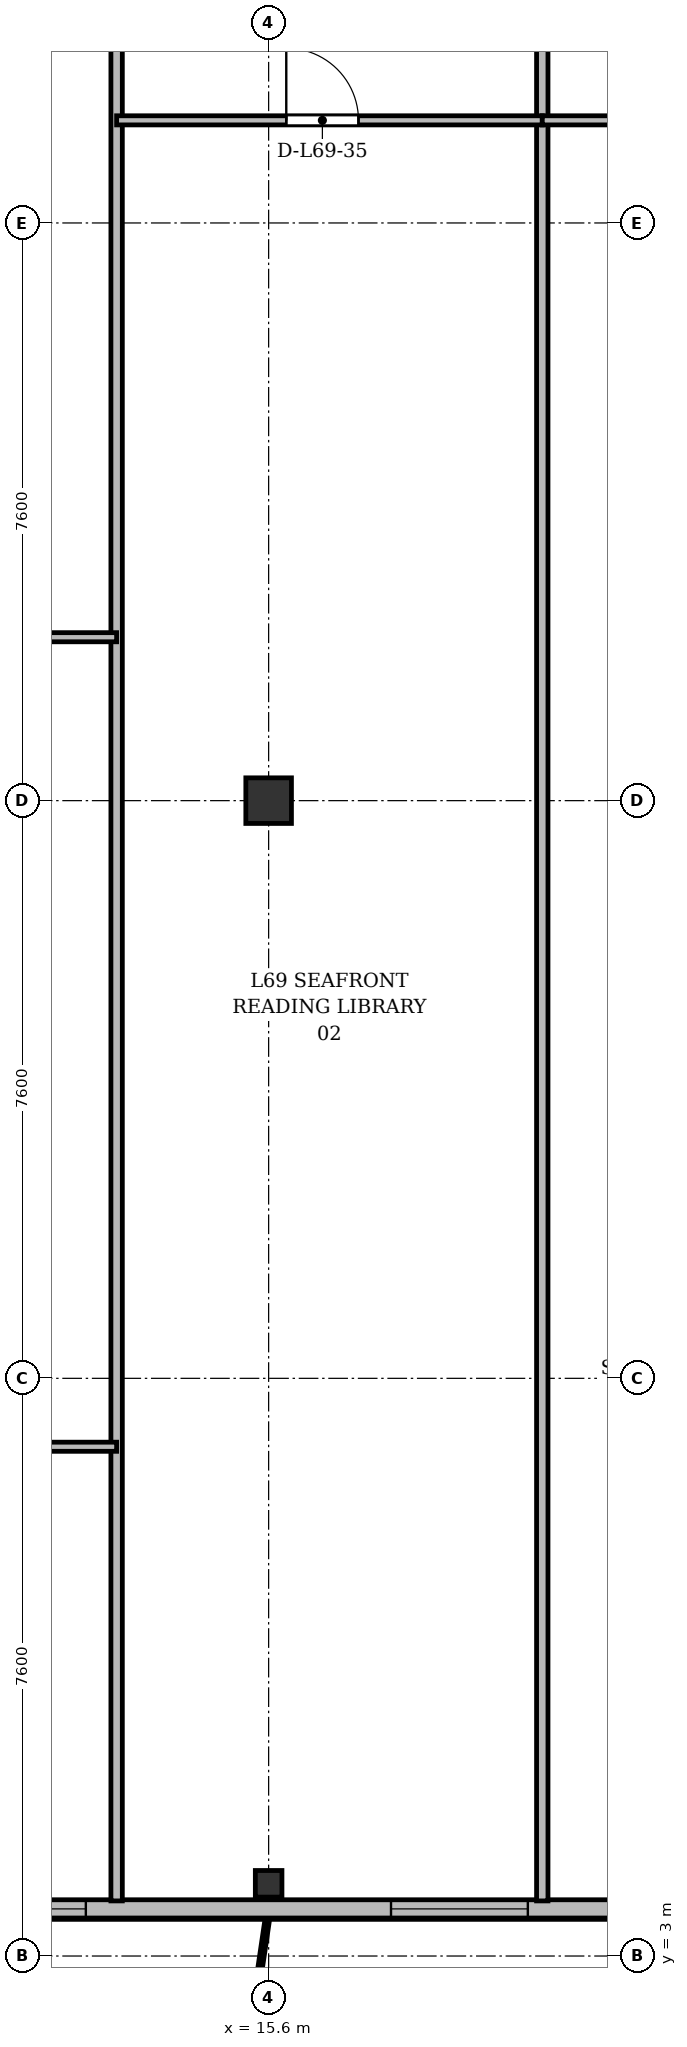
"""IFC4 building model, lengths in metres.
Left out: names, types, materials, properties, quantities, classifications, styles, units other than length and angle.
Written with IfcOpenShell. Run it as: python <this file> out.ifc"""

import sys

from ifc_helpers import new_model, si_unit, direction, frame, frame_2d, origin, origin_2d, place, context, subcontext, project, spatial, rectangle, i_section, extrude, source, transform, mapped, element, fill, save


model = new_model("IFC4")
c1 = context("Model", 3, precision=1e-05, world=origin(), true_north=direction((0.0, 1.0)))
c2 = subcontext(c1, "Body", "Model", "MODEL_VIEW")
j1 = project(units=[si_unit("LENGTHUNIT", "METRE"), si_unit("PLANEANGLEUNIT", "RADIAN")], contexts=[c1])
p1 = place(None, origin())
s1 = spatial("IfcSite", under=j1, at=p1, CompositionType="ELEMENT")
p2 = place(p1, origin())
s2 = spatial("IfcBuilding", under=s1, at=p2, CompositionType="ELEMENT")
p3 = place(p2, frame((0.0, 0.0, 266.7)))
s3 = spatial("IfcBuildingStorey", under=s2, at=p3, CompositionType="ELEMENT", Elevation=266.7)
m1 = source(origin(), c2, "Body", "SweptSolid", [
    extrude(i_section(OverallWidth=0.35, OverallDepth=0.35, WebThickness=0.018, FlangeThickness=0.028, at=origin_2d()), origin(), (0.0, 0.0, 1.0), 3.6),
])
p4 = place(p3, frame((15.6, 3.95, 0.0), z_axis=(0.0, 0.0, 1.0), x_axis=(1.0, 0.0, 0.0)))
e1 = element("IfcColumn", 1, at=p4, inside=s3, PredefinedType="COLUMN", context=c2, shape_type="MappedRepresentation", body=[
    mapped(m1, transform((0.0, 0.0, 0.0), x_axis=(1.0, 0.0, 0.0), y_axis=(0.0, 1.0, 0.0), z_axis=(0.0, 0.0, 1.0), scale=1.0)),
])
m2 = source(origin(), c2, "Body", "SweptSolid", [
    extrude(rectangle(XDim=0.6, YDim=0.6, at=origin_2d()), origin(), (0.0, 0.0, 1.0), 3.6),
])
p5 = place(p3, frame((15.6, 18.2, 0.0), z_axis=(0.0, 0.0, 1.0), x_axis=(1.0, 0.0, 0.0)))
e2 = element("IfcColumn", 2, at=p5, inside=s3, PredefinedType="COLUMN", context=c2, shape_type="MappedRepresentation", body=[
    mapped(m2, transform((0.0, 0.0, 0.0), x_axis=(1.0, 0.0, 0.0), y_axis=(0.0, 1.0, 0.0), z_axis=(0.0, 0.0, 1.0), scale=1.0)),
])
p6 = place(p3, frame((63.2, 3.62, 0.0), z_axis=(0.0, 0.0, 1.0), x_axis=(-1.0, 0.0, 0.0)))
e3 = element("IfcWall", 3, at=p6, inside=s3, PredefinedType="SOLIDWALL", context=c2, shape_type="SweptSolid", body=[
    extrude(rectangle(XDim=52.0, YDim=0.24, at=frame_2d((26.0, 0.0))), origin(), (0.0, 0.0, 1.0), 3.37),
])
p7 = place(p6, frame((0.345, 0.0, 0.9)))
e4 = element("IfcOpeningElement", 4, at=p7, cuts=e3, PredefinedType="OPENING", context=c2, shape_type="SweptSolid", body=[
    extrude(rectangle(XDim=1.2, YDim=1.65, at=frame_2d((0.6, 0.825))), frame((0.0, 0.13, 0.0), z_axis=(0.0, -1.0, 0.0), x_axis=(1.0, 0.0, 0.0)), (0.0, 0.0, 1.0), 0.26),
])
p8 = place(p6, frame((2.15, 0.0, 0.9)))
e5 = element("IfcOpeningElement", 5, at=p8, cuts=e3, PredefinedType="OPENING", context=c2, shape_type="SweptSolid", body=[
    extrude(rectangle(XDim=1.8, YDim=1.8, at=frame_2d((0.9, 0.9))), frame((0.0, 0.13, 0.0), z_axis=(0.0, -1.0, 0.0), x_axis=(1.0, 0.0, 0.0)), (0.0, 0.0, 1.0), 0.26),
])
p9 = place(p6, frame((5.42, 0.0, 0.0)))
e6 = element("IfcOpeningElement", 6, at=p9, cuts=e3, PredefinedType="OPENING", context=c2, shape_type="SweptSolid", body=[
    extrude(rectangle(XDim=1.2, YDim=2.2, at=frame_2d((0.6, 1.1))), frame((0.0, 0.13, 0.0), z_axis=(0.0, -1.0, 0.0), x_axis=(1.0, 0.0, 0.0)), (0.0, 0.0, 1.0), 0.26),
])
p10 = place(p6, frame((8.75, 0.0, 0.9)))
e7 = element("IfcOpeningElement", 7, at=p10, cuts=e3, PredefinedType="OPENING", context=c2, shape_type="SweptSolid", body=[
    extrude(rectangle(XDim=1.5, YDim=1.75, at=frame_2d((0.75, 0.875))), frame((0.0, 0.13, 0.0), z_axis=(0.0, -1.0, 0.0), x_axis=(1.0, 0.0, 0.0)), (0.0, 0.0, 1.0), 0.26),
])
p11 = place(p6, frame((14.8, 0.0, 0.9)))
e8 = element("IfcOpeningElement", 8, at=p11, cuts=e3, PredefinedType="OPENING", context=c2, shape_type="SweptSolid", body=[
    extrude(rectangle(XDim=2.0, YDim=1.95, at=frame_2d((1.0, 0.975))), frame((0.0, 0.13, 0.0), z_axis=(0.0, -1.0, 0.0), x_axis=(1.0, 0.0, 0.0)), (0.0, 0.0, 1.0), 0.26),
])
p12 = place(p6, frame((20.425, 0.0, 0.9)))
e9 = element("IfcOpeningElement", 9, at=p12, cuts=e3, PredefinedType="OPENING", context=c2, shape_type="SweptSolid", body=[
    extrude(rectangle(XDim=1.65, YDim=1.85, at=frame_2d((0.825, 0.925))), frame((0.0, 0.13, 0.0), z_axis=(0.0, -1.0, 0.0), x_axis=(1.0, 0.0, 0.0)), (0.0, 0.0, 1.0), 0.26),
])
p13 = place(p6, frame((24.05, 0.0, 0.9)))
e10 = element("IfcOpeningElement", 10, at=p13, cuts=e3, PredefinedType="OPENING", context=c2, shape_type="SweptSolid", body=[
    extrude(rectangle(XDim=1.8, YDim=1.8, at=frame_2d((0.9, 0.9))), frame((0.0, 0.13, 0.0), z_axis=(0.0, -1.0, 0.0), x_axis=(1.0, 0.0, 0.0)), (0.0, 0.0, 1.0), 0.26),
])
p14 = place(p6, frame((28.6, 0.0, 0.9)))
e11 = element("IfcOpeningElement", 11, at=p14, cuts=e3, PredefinedType="OPENING", context=c2, shape_type="SweptSolid", body=[
    extrude(rectangle(XDim=2.2, YDim=1.8, at=frame_2d((1.1, 0.9))), frame((0.0, 0.13, 0.0), z_axis=(0.0, -1.0, 0.0), x_axis=(1.0, 0.0, 0.0)), (0.0, 0.0, 1.0), 0.26),
])
p15 = place(p6, frame((34.078, 0.0, 0.0)))
e12 = element("IfcOpeningElement", 12, at=p15, cuts=e3, PredefinedType="OPENING", context=c2, shape_type="SweptSolid", body=[
    extrude(rectangle(XDim=1.2, YDim=2.2, at=frame_2d((0.6, 1.1))), frame((0.0, 0.13, 0.0), z_axis=(0.0, -1.0, 0.0), x_axis=(1.0, 0.0, 0.0)), (0.0, 0.0, 1.0), 0.26),
])
p16 = place(p6, frame((37.0, 0.0, 0.9)))
e13 = element("IfcOpeningElement", 13, at=p16, cuts=e3, PredefinedType="OPENING", context=c2, shape_type="SweptSolid", body=[
    extrude(rectangle(XDim=2.0, YDim=1.95, at=frame_2d((1.0, 0.975))), frame((0.0, 0.13, 0.0), z_axis=(0.0, -1.0, 0.0), x_axis=(1.0, 0.0, 0.0)), (0.0, 0.0, 1.0), 0.26),
])
p17 = place(p6, frame((41.075, 0.0, 0.9)))
e14 = element("IfcOpeningElement", 14, at=p17, cuts=e3, PredefinedType="OPENING", context=c2, shape_type="SweptSolid", body=[
    extrude(rectangle(XDim=1.65, YDim=1.85, at=frame_2d((0.825, 0.925))), frame((0.0, 0.13, 0.0), z_axis=(0.0, -1.0, 0.0), x_axis=(1.0, 0.0, 0.0)), (0.0, 0.0, 1.0), 0.26),
])
p18 = place(p6, frame((44.19, 0.0, 0.9)))
e15 = element("IfcOpeningElement", 15, at=p18, cuts=e3, PredefinedType="OPENING", context=c2, shape_type="SweptSolid", body=[
    extrude(rectangle(XDim=1.8, YDim=1.8, at=frame_2d((0.9, 0.9))), frame((0.0, 0.13, 0.0), z_axis=(0.0, -1.0, 0.0), x_axis=(1.0, 0.0, 0.0)), (0.0, 0.0, 1.0), 0.26),
])
p19 = place(p6, frame((50.005, 0.0, 0.9)))
e16 = element("IfcOpeningElement", 16, at=p19, cuts=e3, PredefinedType="OPENING", context=c2, shape_type="SweptSolid", body=[
    extrude(rectangle(XDim=1.5, YDim=1.75, at=frame_2d((0.75, 0.875))), frame((0.0, 0.13, 0.0), z_axis=(0.0, -1.0, 0.0), x_axis=(1.0, 0.0, 0.0)), (0.0, 0.0, 1.0), 0.26),
])
for number, where, z_axis, x_axis in (
    (17, (13.6, 3.725, 0.0), (0.0, 0.0, 1.0), (0.0, 1.0, 0.0)),
    (18, (19.2, 3.725, 0.0), (0.0, 0.0, 1.0), (0.0, 1.0, 0.0)),
):
    element("IfcWall", number, at=place(p3, frame(where, z_axis=z_axis, x_axis=x_axis)), inside=s3, PredefinedType="PARTITIONING", context=c2, shape_type="SweptSolid", body=[
        extrude(rectangle(XDim=27.275, YDim=0.15, at=frame_2d((13.637, 0.0))), origin(), (0.0, 0.0, 1.0), 2.92),
    ])
p20 = place(p3, frame((8.44, 20.35, 0.0), z_axis=(0.0, 0.0, 1.0), x_axis=(1.0, 0.0, 0.0)))
e19 = element("IfcWall", 19, at=p20, inside=s3, PredefinedType="PARTITIONING", context=c2, shape_type="SweptSolid", body=[
    extrude(rectangle(XDim=5.16, YDim=0.12, at=frame_2d((2.58, 0.0))), origin(), (0.0, 0.0, 1.0), 2.87),
])
p21 = place(p20, frame((2.014, 0.0, 0.0)))
e20 = element("IfcOpeningElement", 20, at=p21, cuts=e19, PredefinedType="OPENING", context=c2, shape_type="SweptSolid", body=[
    extrude(rectangle(XDim=0.95, YDim=2.15, at=frame_2d((0.475, 1.075))), frame((0.0, 0.07, 0.0), z_axis=(0.0, -1.0, 0.0), x_axis=(1.0, 0.0, 0.0)), (0.0, 0.0, 1.0), 0.14),
])
p22 = place(p3, frame((8.44, 9.7, 0.0), z_axis=(0.0, 0.0, 1.0), x_axis=(1.0, 0.0, 0.0)))
e21 = element("IfcWall", 21, at=p22, inside=s3, PredefinedType="PARTITIONING", context=c2, shape_type="SweptSolid", body=[
    extrude(rectangle(XDim=5.16, YDim=0.12, at=frame_2d((2.58, 0.0))), origin(), (0.0, 0.0, 1.0), 2.87),
])
p23 = place(p22, frame((2.014, 0.0, 0.0)))
e22 = element("IfcOpeningElement", 22, at=p23, cuts=e21, PredefinedType="OPENING", context=c2, shape_type="SweptSolid", body=[
    extrude(rectangle(XDim=0.95, YDim=2.15, at=frame_2d((0.475, 1.075))), frame((0.0, 0.07, 0.0), z_axis=(0.0, -1.0, 0.0), x_axis=(1.0, 0.0, 0.0)), (0.0, 0.0, 1.0), 0.14),
])
p24 = place(p3, frame((13.6, 27.15, 0.0), z_axis=(0.0, 0.0, 1.0), x_axis=(1.0, 0.0, 0.0)))
e23 = element("IfcWall", 23, at=p24, inside=s3, PredefinedType="PARTITIONING", context=c2, shape_type="SweptSolid", body=[
    extrude(rectangle(XDim=5.6, YDim=0.12, at=frame_2d((2.8, 0.0))), origin(), (0.0, 0.0, 1.0), 2.87),
])
p25 = place(p24, frame((2.232, 0.0, 0.0)))
e24 = element("IfcOpeningElement", 24, at=p25, cuts=e23, PredefinedType="OPENING", context=c2, shape_type="SweptSolid", body=[
    extrude(rectangle(XDim=0.95, YDim=2.15, at=frame_2d((0.475, 1.075))), frame((0.0, 0.07, 0.0), z_axis=(0.0, -1.0, 0.0), x_axis=(1.0, 0.0, 0.0)), (0.0, 0.0, 1.0), 0.14),
])
p26 = place(p3, frame((19.2, 27.15, 0.0), z_axis=(0.0, 0.0, 1.0), x_axis=(1.0, 0.0, 0.0)))
e25 = element("IfcWall", 25, at=p26, inside=s3, PredefinedType="PARTITIONING", context=c2, shape_type="SweptSolid", body=[
    extrude(rectangle(XDim=4.2, YDim=0.12, at=frame_2d((2.1, 0.0))), origin(), (0.0, 0.0, 1.0), 2.87),
])
p27 = place(p26, frame((1.529, 0.0, 0.0)))
e26 = element("IfcOpeningElement", 26, at=p27, cuts=e25, PredefinedType="OPENING", context=c2, shape_type="SweptSolid", body=[
    extrude(rectangle(XDim=0.95, YDim=2.15, at=frame_2d((0.475, 1.075))), frame((0.0, 0.07, 0.0), z_axis=(0.0, -1.0, 0.0), x_axis=(1.0, 0.0, 0.0)), (0.0, 0.0, 1.0), 0.14),
])
m3 = source(origin(), c2, "Body", "SweptSolid", [
    extrude(rectangle(XDim=1.8, YDim=1.8, at=frame_2d((0.9, 0.9))), frame((0.0, 0.03, 0.0), z_axis=(0.0, -1.0, 0.0), x_axis=(1.0, 0.0, 0.0)), (0.0, 0.0, 1.0), 0.06),
])
p28 = place(p18, origin())
e27 = element("IfcWindow", 27, at=p28, inside=s3, PartitioningType="SINGLE_PANEL", PredefinedType="WINDOW", context=c2, shape_type="MappedRepresentation", body=[
    mapped(m3, transform((0.0, 0.0, 0.0), x_axis=(1.0, 0.0, 0.0), y_axis=(0.0, 1.0, 0.0), z_axis=(0.0, 0.0, 1.0), scale=1.0)),
])
fill(e15, e27)
m4 = source(origin(), c2, "Body", "SweptSolid", [
    extrude(rectangle(XDim=1.5, YDim=1.75, at=frame_2d((0.75, 0.875))), frame((0.0, 0.03, 0.0), z_axis=(0.0, -1.0, 0.0), x_axis=(1.0, 0.0, 0.0)), (0.0, 0.0, 1.0), 0.06),
])
p29 = place(p19, origin())
e28 = element("IfcWindow", 28, at=p29, inside=s3, PartitioningType="SINGLE_PANEL", PredefinedType="WINDOW", context=c2, shape_type="MappedRepresentation", body=[
    mapped(m4, transform((0.0, 0.0, 0.0), x_axis=(1.0, 0.0, 0.0), y_axis=(0.0, 1.0, 0.0), z_axis=(0.0, 0.0, 1.0), scale=1.0)),
])
fill(e16, e28)
m5 = source(origin(), c2, "Body", "SweptSolid", [
    extrude(rectangle(XDim=0.95, YDim=2.15, at=frame_2d((0.475, 1.075))), frame((0.0, 0.025, 0.0), z_axis=(0.0, -1.0, 0.0), x_axis=(1.0, 0.0, 0.0)), (0.0, 0.0, 1.0), 0.05),
])
p30 = place(p25, origin())
e29 = element("IfcDoor", 29, at=p30, inside=s3, OperationType="SINGLE_SWING_LEFT", PredefinedType="DOOR", context=c2, shape_type="MappedRepresentation", body=[
    mapped(m5, transform((0.0, 0.0, 0.0), x_axis=(1.0, 0.0, 0.0), y_axis=(0.0, 1.0, 0.0), z_axis=(0.0, 0.0, 1.0), scale=1.0)),
])
fill(e24, e29)
save(model, sys.argv[1])
